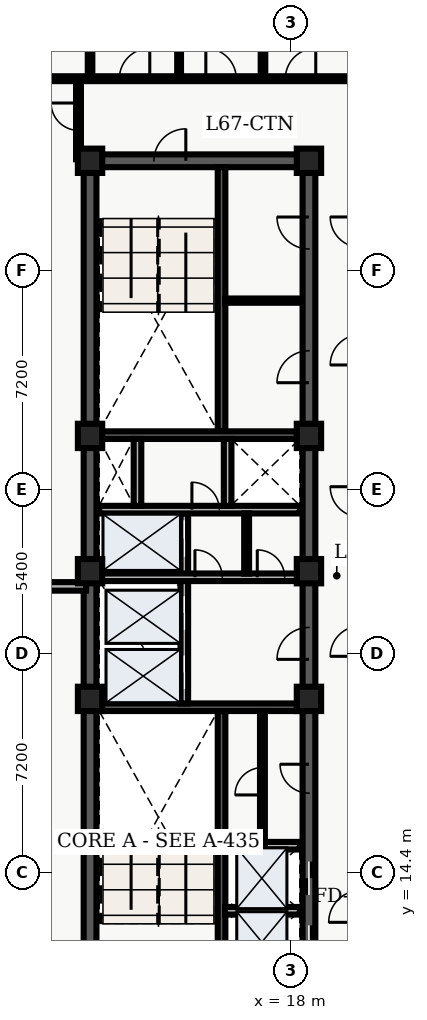
"""IFC4 building model, lengths in metres.
Left out: names, types, materials, properties, quantities, classifications, styles, units other than length and angle.
Written with IfcOpenShell. Run it as: python <this file> out.ifc"""

import sys

from ifc_helpers import new_model, entity, si_unit, converted_unit, direction, frame, origin_with_axes, origin_2d_with_axis, place, context, subcontext, project, spatial, polyline, rectangle, outline, extrude, element, fill, save


model = new_model("IFC4")
c1 = context("Model", 3, precision=1e-05, world=origin_with_axes(), true_north=direction((0.0, 1.0)))
c2 = subcontext(c1, "Body", "Model", "MODEL_VIEW")
j1 = project(units=[si_unit("LENGTHUNIT", "METRE"), converted_unit("PLANEANGLEUNIT", "DEGREE", entity("IfcPlaneAngleMeasure", 0.017), si_unit("PLANEANGLEUNIT", "RADIAN"), dimensions=[0, 0, 0, 0, 0, 0, 0])], contexts=[c1])
p1 = place(None, origin_with_axes())
s1 = spatial("IfcSite", under=j1, at=p1, CompositionType="ELEMENT")
p2 = place(p1, origin_with_axes())
s2 = spatial("IfcBuilding", under=s1, at=p2, CompositionType="ELEMENT")
p3 = place(p2, frame((0.0, 0.0, 272.4), z_axis=(0.0, 0.0, 1.0), x_axis=(1.0, 0.0, 0.0)))
s3 = spatial("IfcBuildingStorey", under=s2, at=p3, CompositionType="ELEMENT", Elevation=272.4)
p4 = place(p3, frame((11.4, 10.8, 0.0), z_axis=(0.0, 0.0, 1.0), x_axis=(0.0, 1.0, 0.0)))
e1 = element("IfcWall", 1, at=p4, inside=s3, PredefinedType="SHEAR", context=c2, shape_type="SweptSolid", body=[
    extrude(outline(polyline([(0.0, -0.21), (27.0, -0.21), (27.0, 0.21), (0.0, 0.21), (0.0, -0.21)])), origin_with_axes(), (0.0, 0.0, 1.0), 3.66),
])
p5 = place(p3, frame((11.4, 37.8, 0.0), z_axis=(0.0, 0.0, 1.0), x_axis=(1.0, 0.0, 0.0)))
e2 = element("IfcWall", 2, at=p5, inside=s3, PredefinedType="SHEAR", context=c2, shape_type="SweptSolid", body=[
    extrude(outline(polyline([(0.0, -0.21), (7.2, -0.21), (7.2, 0.21), (0.0, 0.21), (0.0, -0.21)])), origin_with_axes(), (0.0, 0.0, 1.0), 3.66),
])
p6 = place(p5, frame((2.625, 0.0, 0.0), z_axis=(0.0, 0.0, 1.0), x_axis=(1.0, 0.0, 0.0)))
e3 = element("IfcOpeningElement", 3, at=p6, cuts=e2, PredefinedType="OPENING", context=c2, shape_type="SweptSolid", body=[
    extrude(rectangle(XDim=1.05, YDim=0.44, at=origin_2d_with_axis()), origin_with_axes(), (0.0, 0.0, 1.0), 2.15),
])
p7 = place(p3, frame((18.6, 10.8, 0.0), z_axis=(0.0, 0.0, 1.0), x_axis=(0.0, 1.0, 0.0)))
e4 = element("IfcWall", 4, at=p7, inside=s3, PredefinedType="SHEAR", context=c2, shape_type="SweptSolid", body=[
    extrude(outline(polyline([(0.0, -0.21), (13.5, -0.21), (13.5, 0.21), (0.0, 0.21), (0.0, -0.21)])), origin_with_axes(), (0.0, 0.0, 1.0), 3.66),
])
p8 = place(p7, frame((1.3, 0.0, 0.0), z_axis=(0.0, 0.0, 1.0), x_axis=(1.0, 0.0, 0.0)))
e5 = element("IfcOpeningElement", 5, at=p8, cuts=e4, PredefinedType="OPENING", context=c2, shape_type="SweptSolid", body=[
    extrude(rectangle(XDim=1.1, YDim=0.44, at=origin_2d_with_axis()), origin_with_axes(), (0.0, 0.0, 1.0), 2.15),
])
p9 = place(p7, frame((3.4, 0.0, 0.0), z_axis=(0.0, 0.0, 1.0), x_axis=(1.0, 0.0, 0.0)))
e6 = element("IfcOpeningElement", 6, at=p9, cuts=e4, PredefinedType="OPENING", context=c2, shape_type="SweptSolid", body=[
    extrude(rectangle(XDim=1.1, YDim=0.44, at=origin_2d_with_axis()), origin_with_axes(), (0.0, 0.0, 1.0), 2.15),
])
p10 = place(p7, frame((11.125, 0.0, 0.0), z_axis=(0.0, 0.0, 1.0), x_axis=(1.0, 0.0, 0.0)))
e7 = element("IfcOpeningElement", 7, at=p10, cuts=e4, PredefinedType="OPENING", context=c2, shape_type="SweptSolid", body=[
    extrude(rectangle(XDim=1.05, YDim=0.44, at=origin_2d_with_axis()), origin_with_axes(), (0.0, 0.0, 1.0), 2.15),
])
p11 = place(p7, frame((6.675, 0.0, 0.0), z_axis=(0.0, 0.0, 1.0), x_axis=(1.0, 0.0, 0.0)))
e8 = element("IfcOpeningElement", 8, at=p11, cuts=e4, PredefinedType="OPENING", context=c2, shape_type="SweptSolid", body=[
    extrude(rectangle(XDim=0.95, YDim=0.44, at=origin_2d_with_axis()), origin_with_axes(), (0.0, 0.0, 1.0), 2.15),
])
p12 = place(p3, frame((18.6, 24.3, 0.0), z_axis=(0.0, 0.0, 1.0), x_axis=(0.0, 1.0, 0.0)))
e9 = element("IfcWall", 9, at=p12, inside=s3, PredefinedType="SHEAR", context=c2, shape_type="SweptSolid", body=[
    extrude(outline(polyline([(0.0, -0.21), (13.5, -0.21), (13.5, 0.21), (0.0, 0.21), (0.0, -0.21)])), origin_with_axes(), (0.0, 0.0, 1.0), 3.66),
])
p13 = place(p12, frame((6.725, 0.0, 0.0), z_axis=(0.0, 0.0, 1.0), x_axis=(1.0, 0.0, 0.0)))
e10 = element("IfcOpeningElement", 10, at=p13, cuts=e9, PredefinedType="OPENING", context=c2, shape_type="SweptSolid", body=[
    extrude(rectangle(XDim=1.05, YDim=0.44, at=origin_2d_with_axis()), origin_with_axes(), (0.0, 0.0, 1.0), 2.15),
])
p14 = place(p12, frame((11.125, 0.0, 0.0), z_axis=(0.0, 0.0, 1.0), x_axis=(1.0, 0.0, 0.0)))
e11 = element("IfcOpeningElement", 11, at=p14, cuts=e9, PredefinedType="OPENING", context=c2, shape_type="SweptSolid", body=[
    extrude(rectangle(XDim=1.05, YDim=0.44, at=origin_2d_with_axis()), origin_with_axes(), (0.0, 0.0, 1.0), 2.15),
])
p15 = place(p3, frame((15.725, 11.01, 0.0), z_axis=(0.0, 0.0, 1.0), x_axis=(0.0, 1.0, 0.0)))
e12 = element("IfcWall", 12, at=p15, inside=s3, PredefinedType="SHEAR", context=c2, shape_type="SweptSolid", body=[
    extrude(outline(polyline([(0.0, -0.125), (8.69, -0.125), (8.69, 0.125), (0.0, 0.125), (0.0, -0.125)])), origin_with_axes(), (0.0, 0.0, 1.0), 3.66),
])
p16 = place(p3, frame((11.61, 19.825, 0.0), z_axis=(0.0, 0.0, 1.0), x_axis=(1.0, 0.0, 0.0)))
e13 = element("IfcWall", 13, at=p16, inside=s3, PredefinedType="SHEAR", context=c2, shape_type="SweptSolid", body=[
    extrude(outline(polyline([(0.0, -0.125), (6.78, -0.125), (6.78, 0.125), (0.0, 0.125), (0.0, -0.125)])), origin_with_axes(), (0.0, 0.0, 1.0), 3.66),
])
p17 = place(p3, frame((15.725, 28.9, 0.0), z_axis=(0.0, 0.0, 1.0), x_axis=(0.0, 1.0, 0.0)))
e14 = element("IfcWall", 14, at=p17, inside=s3, PredefinedType="SHEAR", context=c2, shape_type="SweptSolid", body=[
    extrude(outline(polyline([(0.0, -0.125), (8.69, -0.125), (8.69, 0.125), (0.0, 0.125), (0.0, -0.125)])), origin_with_axes(), (0.0, 0.0, 1.0), 3.66),
])
p18 = place(p3, frame((11.61, 28.775, 0.0), z_axis=(0.0, 0.0, 1.0), x_axis=(1.0, 0.0, 0.0)))
e15 = element("IfcWall", 15, at=p18, inside=s3, PredefinedType="SHEAR", context=c2, shape_type="SweptSolid", body=[
    extrude(outline(polyline([(0.0, -0.125), (6.78, -0.125), (6.78, 0.125), (0.0, 0.125), (0.0, -0.125)])), origin_with_axes(), (0.0, 0.0, 1.0), 3.66),
])
p19 = place(p3, frame((14.5, 19.95, 0.0), z_axis=(0.0, 0.0, 1.0), x_axis=(0.0, 1.0, 0.0)))
e16 = element("IfcWall", 16, at=p19, inside=s3, PredefinedType="SOLIDWALL", context=c2, shape_type="SweptSolid", body=[
    extrude(outline(polyline([(0.0, -0.125), (6.25, -0.125), (6.25, 0.125), (0.0, 0.125), (0.0, -0.125)])), origin_with_axes(), (0.0, 0.0, 1.0), 2.7),
])
p20 = place(p19, frame((1.025, 0.0, 0.0), z_axis=(0.0, 0.0, 1.0), x_axis=(1.0, 0.0, 0.0)))
e17 = element("IfcOpeningElement", 17, at=p20, cuts=e16, PredefinedType="OPENING", context=c2, shape_type="SweptSolid", body=[
    extrude(rectangle(XDim=1.1, YDim=0.27, at=origin_2d_with_axis()), origin_with_axes(), (0.0, 0.0, 1.0), 2.15),
])
p21 = place(p19, frame((2.975, 0.0, 0.0), z_axis=(0.0, 0.0, 1.0), x_axis=(1.0, 0.0, 0.0)))
e18 = element("IfcOpeningElement", 18, at=p21, cuts=e16, PredefinedType="OPENING", context=c2, shape_type="SweptSolid", body=[
    extrude(rectangle(XDim=1.1, YDim=0.27, at=origin_2d_with_axis()), origin_with_axes(), (0.0, 0.0, 1.0), 2.15),
])
p22 = place(p19, frame((5.425, 0.0, 0.0), z_axis=(0.0, 0.0, 1.0), x_axis=(1.0, 0.0, 0.0)))
e19 = element("IfcOpeningElement", 19, at=p22, cuts=e16, PredefinedType="OPENING", context=c2, shape_type="SweptSolid", body=[
    extrude(rectangle(XDim=1.2, YDim=0.27, at=origin_2d_with_axis()), origin_with_axes(), (0.0, 0.0, 1.0), 2.15),
])
p23 = place(p3, frame((11.7, 24.1, 0.0), z_axis=(0.0, 0.0, 1.0), x_axis=(1.0, 0.0, 0.0)))
e20 = element("IfcWall", 20, at=p23, inside=s3, PredefinedType="SOLIDWALL", context=c2, shape_type="SweptSolid", body=[
    extrude(outline(polyline([(0.0, -0.125), (6.6, -0.125), (6.6, 0.125), (0.0, 0.125), (0.0, -0.125)])), origin_with_axes(), (0.0, 0.0, 1.0), 2.7),
])
p24 = place(p23, frame((3.6, 0.0, 0.0), z_axis=(0.0, 0.0, 1.0), x_axis=(1.0, 0.0, 0.0)))
e21 = element("IfcOpeningElement", 21, at=p24, cuts=e20, PredefinedType="OPENING", context=c2, shape_type="SweptSolid", body=[
    extrude(rectangle(XDim=0.9, YDim=0.27, at=origin_2d_with_axis()), origin_with_axes(), (0.0, 0.0, 1.0), 2.15),
])
p25 = place(p23, frame((5.65, 0.0, 0.0), z_axis=(0.0, 0.0, 1.0), x_axis=(1.0, 0.0, 0.0)))
e22 = element("IfcOpeningElement", 22, at=p25, cuts=e20, PredefinedType="OPENING", context=c2, shape_type="SweptSolid", body=[
    extrude(rectangle(XDim=0.9, YDim=0.27, at=origin_2d_with_axis()), origin_with_axes(), (0.0, 0.0, 1.0), 2.15),
])
p26 = place(p3, frame((11.7, 26.325, 0.0), z_axis=(0.0, 0.0, 1.0), x_axis=(1.0, 0.0, 0.0)))
e23 = element("IfcWall", 23, at=p26, inside=s3, PredefinedType="SOLIDWALL", context=c2, shape_type="SweptSolid", body=[
    extrude(outline(polyline([(0.0, -0.125), (6.6, -0.125), (6.6, 0.125), (0.0, 0.125), (0.0, -0.125)])), origin_with_axes(), (0.0, 0.0, 1.0), 2.7),
])
p27 = place(p26, frame((3.5, 0.0, 0.0), z_axis=(0.0, 0.0, 1.0), x_axis=(1.0, 0.0, 0.0)))
e24 = element("IfcOpeningElement", 24, at=p27, cuts=e23, PredefinedType="OPENING", context=c2, shape_type="SweptSolid", body=[
    extrude(rectangle(XDim=0.9, YDim=0.27, at=origin_2d_with_axis()), origin_with_axes(), (0.0, 0.0, 1.0), 2.15),
])
for number, where, z_axis, x_axis in (
    (25, (12.96, 26.45, 0.0), (0.0, 0.0, 1.0), (0.0, 1.0, 0.0)),
    (26, (15.925, 26.45, 0.0), (0.0, 0.0, 1.0), (0.0, 1.0, 0.0)),
):
    element("IfcWall", number, at=place(p3, frame(where, z_axis=z_axis, x_axis=x_axis)), inside=s3, PredefinedType="SOLIDWALL", context=c2, shape_type="SweptSolid", body=[
        extrude(outline(polyline([(0.0, -0.125), (2.2, -0.125), (2.2, 0.125), (0.0, 0.125), (0.0, -0.125)])), origin_with_axes(), (0.0, 0.0, 1.0), 2.7),
    ])
for number, where, z_axis, x_axis in (
    (27, (11.4, 20.1, 0.0), (0.0, 0.0, 1.0), (1.0, 0.0, 0.0)),
    (28, (11.4, 24.3, 0.0), (0.0, 0.0, 1.0), (1.0, 0.0, 0.0)),
    (29, (11.4, 28.75, 0.0), (0.0, 0.0, 1.0), (1.0, 0.0, 0.0)),
    (30, (11.4, 37.8, 0.0), (0.0, 0.0, 1.0), (1.0, 0.0, 0.0)),
    (31, (18.6, 20.1, 0.0), (0.0, 0.0, 1.0), (1.0, 0.0, 0.0)),
    (32, (18.6, 24.3, 0.0), (0.0, 0.0, 1.0), (1.0, 0.0, 0.0)),
    (33, (18.6, 28.75, 0.0), (0.0, 0.0, 1.0), (1.0, 0.0, 0.0)),
    (34, (18.6, 37.8, 0.0), (0.0, 0.0, 1.0), (1.0, 0.0, 0.0)),
):
    element("IfcColumn", number, at=place(p3, frame(where, z_axis=z_axis, x_axis=x_axis)), inside=s3, PredefinedType="COLUMN", context=c2, shape_type="SweptSolid", body=[
        extrude(rectangle(XDim=0.8, YDim=0.8, at=origin_2d_with_axis()), origin_with_axes(), (0.0, 0.0, 1.0), 3.9),
    ])
p28 = place(p3, frame((16.55, 24.22, 0.0), z_axis=(0.0, 0.0, 1.0), x_axis=(0.0, 1.0, 0.0)))
e35 = element("IfcWall", 35, at=p28, inside=s3, PredefinedType="PARTITIONING", context=c2, shape_type="SweptSolid", body=[
    extrude(outline(polyline([(0.0, -0.08), (1.98, -0.08), (1.98, 0.08), (0.0, 0.08), (0.0, -0.08)])), origin_with_axes(), (0.0, 0.0, 1.0), 2.7),
])
for number, where, z_axis, x_axis in (
    (36, (15.84, 13.13, 0.0), (0.0, 0.0, 1.0), (1.0, 0.0, 0.0)),
    (37, (15.84, 15.27, 0.0), (0.0, 0.0, 1.0), (1.0, 0.0, 0.0)),
):
    element("IfcWall", number, at=place(p3, frame(where, z_axis=z_axis, x_axis=x_axis)), inside=s3, PredefinedType="SOLIDWALL", context=c2, shape_type="SweptSolid", body=[
        extrude(outline(polyline([(0.0, -0.125), (2.46, -0.125), (2.46, 0.125), (0.0, 0.125), (0.0, -0.125)])), origin_with_axes(), (0.0, 0.0, 1.0), 2.7),
    ])
p29 = place(p3, frame((17.07, 15.34, 0.0), z_axis=(0.0, 0.0, 1.0), x_axis=(0.0, 1.0, 0.0)))
e38 = element("IfcWall", 38, at=p29, inside=s3, PredefinedType="PARTITIONING", context=c2, shape_type="SweptSolid", body=[
    extrude(outline(polyline([(0.0, -0.08), (4.36, -0.08), (4.36, 0.08), (0.0, 0.08), (0.0, -0.08)])), origin_with_axes(), (0.0, 0.0, 1.0), 2.7),
])
p30 = place(p29, frame((2.05, 0.0, 0.0), z_axis=(0.0, 0.0, 1.0), x_axis=(1.0, 0.0, 0.0)))
e39 = element("IfcOpeningElement", 39, at=p30, cuts=e38, PredefinedType="OPENING", context=c2, shape_type="SweptSolid", body=[
    extrude(rectangle(XDim=0.9, YDim=0.18, at=origin_2d_with_axis()), origin_with_axes(), (0.0, 0.0, 1.0), 2.15),
])
p31 = place(p3, frame((15.84, 33.2, 0.0), z_axis=(0.0, 0.0, 1.0), x_axis=(1.0, 0.0, 0.0)))
e40 = element("IfcWall", 40, at=p31, inside=s3, PredefinedType="PARTITIONING", context=c2, shape_type="SweptSolid", body=[
    extrude(outline(polyline([(0.0, -0.07), (2.46, -0.07), (2.46, 0.07), (0.0, 0.07), (0.0, -0.07)])), origin_with_axes(), (0.0, 0.0, 1.0), 2.7),
])
p32 = place(p3, frame((8.135, 40.5, 0.0), z_axis=(0.0, 0.0, 1.0), x_axis=(1.0, 0.0, 0.0)))
e41 = element("IfcWall", 41, at=p32, inside=s3, PredefinedType="PARTITIONING", context=c2, shape_type="SweptSolid", body=[
    extrude(outline(polyline([(0.0, -0.08), (23.93, -0.08), (23.93, 0.08), (0.0, 0.08), (0.0, -0.08)])), origin_with_axes(), (0.0, 0.0, 1.0), 2.7),
])
p33 = place(p32, frame((0.76, 0.0, 0.0), z_axis=(0.0, 0.0, 1.0), x_axis=(1.0, 0.0, 0.0)))
e42 = element("IfcOpeningElement", 42, at=p33, cuts=e41, PredefinedType="OPENING", context=c2, shape_type="SweptSolid", body=[
    extrude(rectangle(XDim=1.0, YDim=0.18, at=origin_2d_with_axis()), origin_with_axes(), (0.0, 0.0, 1.0), 2.15),
])
p34 = place(p32, frame((4.729, 0.0, 0.0), z_axis=(0.0, 0.0, 1.0), x_axis=(1.0, 0.0, 0.0)))
e43 = element("IfcOpeningElement", 43, at=p34, cuts=e41, PredefinedType="OPENING", context=c2, shape_type="SweptSolid", body=[
    extrude(rectangle(XDim=1.0, YDim=0.18, at=origin_2d_with_axis()), origin_with_axes(), (0.0, 0.0, 1.0), 2.15),
])
p35 = place(p32, frame((7.574, 0.0, 0.0), z_axis=(0.0, 0.0, 1.0), x_axis=(1.0, 0.0, 0.0)))
e44 = element("IfcOpeningElement", 44, at=p35, cuts=e41, PredefinedType="OPENING", context=c2, shape_type="SweptSolid", body=[
    extrude(rectangle(XDim=1.0, YDim=0.18, at=origin_2d_with_axis()), origin_with_axes(), (0.0, 0.0, 1.0), 2.15),
])
p36 = place(p32, frame((10.189, 0.0, 0.0), z_axis=(0.0, 0.0, 1.0), x_axis=(1.0, 0.0, 0.0)))
e45 = element("IfcOpeningElement", 45, at=p36, cuts=e41, PredefinedType="OPENING", context=c2, shape_type="SweptSolid", body=[
    extrude(rectangle(XDim=1.0, YDim=0.18, at=origin_2d_with_axis()), origin_with_axes(), (0.0, 0.0, 1.0), 2.15),
])
p37 = place(p3, frame((11.02, 37.85, 0.0), z_axis=(0.0, 0.0, 1.0), x_axis=(0.0, 1.0, 0.0)))
e46 = element("IfcWall", 46, at=p37, inside=s3, PredefinedType="PARTITIONING", context=c2, shape_type="SweptSolid", body=[
    extrude(outline(polyline([(0.0, -0.08), (2.65, -0.08), (2.65, 0.08), (0.0, 0.08), (0.0, -0.08)])), origin_with_axes(), (0.0, 0.0, 1.0), 2.7),
])
p38 = place(p37, frame((1.4, 0.0, 0.0), z_axis=(0.0, 0.0, 1.0), x_axis=(1.0, 0.0, 0.0)))
e47 = element("IfcOpeningElement", 47, at=p38, cuts=e46, PredefinedType="OPENING", context=c2, shape_type="SweptSolid", body=[
    extrude(rectangle(XDim=0.9, YDim=0.18, at=origin_2d_with_axis()), origin_with_axes(), (0.0, 0.0, 1.0), 2.15),
])
p39 = place(p3, frame((8.135, 23.8, 0.0), z_axis=(0.0, 0.0, 1.0), x_axis=(1.0, 0.0, 0.0)))
e48 = element("IfcWall", 48, at=p39, inside=s3, PredefinedType="PARTITIONING", context=c2, shape_type="SweptSolid", body=[
    extrude(outline(polyline([(0.0, -0.14), (3.135, -0.14), (3.135, 0.14), (0.0, 0.14), (0.0, -0.14)])), origin_with_axes(), (0.0, 0.0, 1.0), 2.7),
])
p40 = place(p3, frame((11.4, 40.6, 0.0), z_axis=(0.0, 0.0, 1.0), x_axis=(0.0, 1.0, 0.0)))
e49 = element("IfcWall", 49, at=p40, inside=s3, PredefinedType="PARTITIONING", context=c2, shape_type="SweptSolid", body=[
    extrude(outline(polyline([(0.0, -0.075), (5.42, -0.075), (5.42, 0.075), (0.0, 0.075), (0.0, -0.075)])), origin_with_axes(), (0.0, 0.0, 1.0), 2.7),
])
p41 = place(p3, frame((14.329, 40.6, 0.0), z_axis=(0.0, 0.0, 1.0), x_axis=(0.0, 1.0, 0.0)))
e50 = element("IfcWall", 50, at=p41, inside=s3, PredefinedType="PARTITIONING", context=c2, shape_type="SweptSolid", body=[
    extrude(outline(polyline([(0.0, -0.062), (5.42, -0.062), (5.42, 0.062), (0.0, 0.062), (0.0, -0.062)])), origin_with_axes(), (0.0, 0.0, 1.0), 2.7),
])
p42 = place(p3, frame((17.088, 40.6, 0.0), z_axis=(0.0, 0.0, 1.0), x_axis=(0.0, 1.0, 0.0)))
e51 = element("IfcWall", 51, at=p42, inside=s3, PredefinedType="PARTITIONING", context=c2, shape_type="SweptSolid", body=[
    extrude(outline(polyline([(0.0, -0.075), (5.42, -0.075), (5.42, 0.075), (0.0, 0.075), (0.0, -0.075)])), origin_with_axes(), (0.0, 0.0, 1.0), 2.7),
])
p43 = place(p7, frame((1.3, 0.0, 0.0), z_axis=(0.0, 0.0, 1.0), x_axis=(1.0, 0.0, 0.0)))
e52 = element("IfcDoor", 52, at=p43, inside=s3, OperationType="SLIDING_TO_LEFT", PredefinedType="DOOR", context=c2, shape_type="SweptSolid", body=[
    extrude(rectangle(XDim=1.1, YDim=0.09, at=origin_2d_with_axis()), origin_with_axes(), (0.0, 0.0, 1.0), 2.15),
])
fill(e5, e52)
p44 = place(p7, frame((3.4, 0.0, 0.0), z_axis=(0.0, 0.0, 1.0), x_axis=(1.0, 0.0, 0.0)))
e53 = element("IfcDoor", 53, at=p44, inside=s3, OperationType="SLIDING_TO_RIGHT", PredefinedType="DOOR", context=c2, shape_type="SweptSolid", body=[
    extrude(rectangle(XDim=1.1, YDim=0.09, at=origin_2d_with_axis()), origin_with_axes(), (0.0, 0.0, 1.0), 2.15),
])
fill(e6, e53)
p45 = place(p19, frame((1.025, 0.0, 0.0), z_axis=(0.0, 0.0, 1.0), x_axis=(1.0, 0.0, 0.0)))
e54 = element("IfcDoor", 54, at=p45, inside=s3, OperationType="SLIDING_TO_LEFT", PredefinedType="DOOR", context=c2, shape_type="SweptSolid", body=[
    extrude(rectangle(XDim=1.1, YDim=0.09, at=origin_2d_with_axis()), origin_with_axes(), (0.0, 0.0, 1.0), 2.15),
])
fill(e17, e54)
p46 = place(p19, frame((2.975, 0.0, 0.0), z_axis=(0.0, 0.0, 1.0), x_axis=(1.0, 0.0, 0.0)))
e55 = element("IfcDoor", 55, at=p46, inside=s3, OperationType="SLIDING_TO_RIGHT", PredefinedType="DOOR", context=c2, shape_type="SweptSolid", body=[
    extrude(rectangle(XDim=1.1, YDim=0.09, at=origin_2d_with_axis()), origin_with_axes(), (0.0, 0.0, 1.0), 2.15),
])
fill(e18, e55)
p47 = place(p19, frame((5.425, 0.0, 0.0), z_axis=(0.0, 0.0, 1.0), x_axis=(1.0, 0.0, 0.0)))
e56 = element("IfcDoor", 56, at=p47, inside=s3, OperationType="DOUBLE_DOOR_SLIDING", PredefinedType="DOOR", context=c2, shape_type="SweptSolid", body=[
    extrude(rectangle(XDim=1.2, YDim=0.09, at=origin_2d_with_axis()), origin_with_axes(), (0.0, 0.0, 1.0), 2.15),
])
fill(e19, e56)
p48 = place(p5, frame((2.625, 0.0, 0.0), z_axis=(0.0, 0.0, 1.0), x_axis=(1.0, 0.0, 0.0)))
e57 = element("IfcDoor", 57, at=p48, inside=s3, OperationType="SINGLE_SWING_RIGHT", PredefinedType="DOOR", context=c2, shape_type="SweptSolid", body=[
    extrude(rectangle(XDim=1.05, YDim=0.09, at=origin_2d_with_axis()), origin_with_axes(), (0.0, 0.0, 1.0), 2.15),
])
fill(e3, e57)
p49 = place(p7, frame((11.125, 0.0, 0.0), z_axis=(0.0, 0.0, 1.0), x_axis=(1.0, 0.0, 0.0)))
e58 = element("IfcDoor", 58, at=p49, inside=s3, OperationType="SINGLE_SWING_LEFT", PredefinedType="DOOR", context=c2, shape_type="SweptSolid", body=[
    extrude(rectangle(XDim=1.05, YDim=0.09, at=origin_2d_with_axis()), origin_with_axes(), (0.0, 0.0, 1.0), 2.15),
])
fill(e7, e58)
p50 = place(p23, frame((3.6, 0.0, 0.0), z_axis=(0.0, 0.0, 1.0), x_axis=(1.0, 0.0, 0.0)))
e59 = element("IfcDoor", 59, at=p50, inside=s3, OperationType="SINGLE_SWING_LEFT", PredefinedType="DOOR", context=c2, shape_type="SweptSolid", body=[
    extrude(rectangle(XDim=0.9, YDim=0.09, at=origin_2d_with_axis()), origin_with_axes(), (0.0, 0.0, 1.0), 2.15),
])
fill(e21, e59)
p51 = place(p23, frame((5.65, 0.0, 0.0), z_axis=(0.0, 0.0, 1.0), x_axis=(1.0, 0.0, 0.0)))
e60 = element("IfcDoor", 60, at=p51, inside=s3, OperationType="SINGLE_SWING_LEFT", PredefinedType="DOOR", context=c2, shape_type="SweptSolid", body=[
    extrude(rectangle(XDim=0.9, YDim=0.09, at=origin_2d_with_axis()), origin_with_axes(), (0.0, 0.0, 1.0), 2.15),
])
fill(e22, e60)
p52 = place(p26, frame((3.5, 0.0, 0.0), z_axis=(0.0, 0.0, 1.0), x_axis=(1.0, 0.0, 0.0)))
e61 = element("IfcDoor", 61, at=p52, inside=s3, OperationType="SINGLE_SWING_LEFT", PredefinedType="DOOR", context=c2, shape_type="SweptSolid", body=[
    extrude(rectangle(XDim=0.9, YDim=0.09, at=origin_2d_with_axis()), origin_with_axes(), (0.0, 0.0, 1.0), 2.15),
])
fill(e24, e61)
p53 = place(p29, frame((2.05, 0.0, 0.0), z_axis=(0.0, 0.0, 1.0), x_axis=(1.0, 0.0, 0.0)))
e62 = element("IfcDoor", 62, at=p53, inside=s3, OperationType="SINGLE_SWING_LEFT", PredefinedType="DOOR", context=c2, shape_type="SweptSolid", body=[
    extrude(rectangle(XDim=0.9, YDim=0.09, at=origin_2d_with_axis()), origin_with_axes(), (0.0, 0.0, 1.0), 2.15),
])
fill(e39, e62)
p54 = place(p7, frame((6.675, 0.0, 0.0), z_axis=(0.0, 0.0, 1.0), x_axis=(1.0, 0.0, 0.0)))
e63 = element("IfcDoor", 63, at=p54, inside=s3, OperationType="SINGLE_SWING_RIGHT", PredefinedType="DOOR", context=c2, shape_type="SweptSolid", body=[
    extrude(rectangle(XDim=0.95, YDim=0.09, at=origin_2d_with_axis()), origin_with_axes(), (0.0, 0.0, 1.0), 2.15),
])
fill(e8, e63)
p55 = place(p12, frame((6.725, 0.0, 0.0), z_axis=(0.0, 0.0, 1.0), x_axis=(1.0, 0.0, 0.0)))
e64 = element("IfcDoor", 64, at=p55, inside=s3, OperationType="SINGLE_SWING_LEFT", PredefinedType="DOOR", context=c2, shape_type="SweptSolid", body=[
    extrude(rectangle(XDim=1.05, YDim=0.09, at=origin_2d_with_axis()), origin_with_axes(), (0.0, 0.0, 1.0), 2.15),
])
fill(e10, e64)
p56 = place(p12, frame((11.125, 0.0, 0.0), z_axis=(0.0, 0.0, 1.0), x_axis=(1.0, 0.0, 0.0)))
e65 = element("IfcDoor", 65, at=p56, inside=s3, OperationType="SINGLE_SWING_RIGHT", PredefinedType="DOOR", context=c2, shape_type="SweptSolid", body=[
    extrude(rectangle(XDim=1.05, YDim=0.09, at=origin_2d_with_axis()), origin_with_axes(), (0.0, 0.0, 1.0), 2.15),
])
fill(e11, e65)
p57 = place(p37, frame((1.4, 0.0, 0.0), z_axis=(0.0, 0.0, 1.0), x_axis=(1.0, 0.0, 0.0)))
e66 = element("IfcDoor", 66, at=p57, inside=s3, OperationType="SINGLE_SWING_RIGHT", PredefinedType="DOOR", context=c2, shape_type="SweptSolid", body=[
    extrude(rectangle(XDim=0.9, YDim=0.09, at=origin_2d_with_axis()), origin_with_axes(), (0.0, 0.0, 1.0), 2.15),
])
fill(e47, e66)
p58 = place(p32, frame((4.729, 0.0, 0.0), z_axis=(0.0, 0.0, 1.0), x_axis=(1.0, 0.0, 0.0)))
e67 = element("IfcDoor", 67, at=p58, inside=s3, OperationType="SINGLE_SWING_RIGHT", PredefinedType="DOOR", context=c2, shape_type="SweptSolid", body=[
    extrude(rectangle(XDim=1.0, YDim=0.09, at=origin_2d_with_axis()), origin_with_axes(), (0.0, 0.0, 1.0), 2.15),
])
fill(e43, e67)
p59 = place(p32, frame((7.574, 0.0, 0.0), z_axis=(0.0, 0.0, 1.0), x_axis=(1.0, 0.0, 0.0)))
e68 = element("IfcDoor", 68, at=p59, inside=s3, OperationType="SINGLE_SWING_LEFT", PredefinedType="DOOR", context=c2, shape_type="SweptSolid", body=[
    extrude(rectangle(XDim=1.0, YDim=0.09, at=origin_2d_with_axis()), origin_with_axes(), (0.0, 0.0, 1.0), 2.15),
])
fill(e44, e68)
p60 = place(p32, frame((10.189, 0.0, 0.0), z_axis=(0.0, 0.0, 1.0), x_axis=(1.0, 0.0, 0.0)))
e69 = element("IfcDoor", 69, at=p60, inside=s3, OperationType="SINGLE_SWING_RIGHT", PredefinedType="DOOR", context=c2, shape_type="SweptSolid", body=[
    extrude(rectangle(XDim=1.0, YDim=0.09, at=origin_2d_with_axis()), origin_with_axes(), (0.0, 0.0, 1.0), 2.15),
])
fill(e45, e69)
save(model, sys.argv[1])
